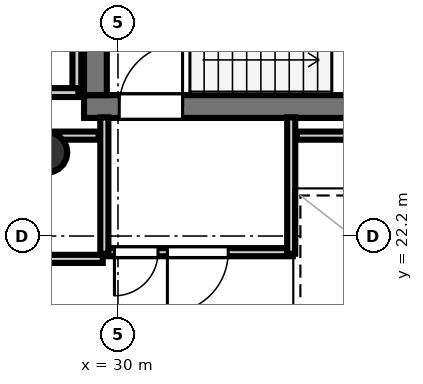
"""IFC4 building model, lengths in metres.
Left out: names, types, materials, properties, quantities, classifications, styles, units other than length and angle.
Written with IfcOpenShell. Run it as: python <this file> out.ifc"""

import sys

from ifc_helpers import new_model, si_unit, direction, frame, frame_2d, origin, origin_2d, place, context, subcontext, project, spatial, rectangle, hollow_circle, extrude, element, fill, save


model = new_model("IFC4")
c1 = context("Model", 3, precision=1e-05, world=origin(), true_north=direction((0.0, 1.0)))
c2 = subcontext(c1, "Body", "Model", "MODEL_VIEW")
j1 = project(units=[si_unit("LENGTHUNIT", "METRE"), si_unit("PLANEANGLEUNIT", "RADIAN")], contexts=[c1])
p1 = place(None, origin())
s1 = spatial("IfcSite", under=j1, at=p1, CompositionType="ELEMENT")
p2 = place(p1, origin())
s2 = spatial("IfcBuilding", under=s1, at=p2, CompositionType="ELEMENT")
p3 = place(p2, frame((0.0, 0.0, 333.3)))
s3 = spatial("IfcBuildingStorey", under=s2, at=p3, CompositionType="ELEMENT", Elevation=333.3)
p4 = place(p3, frame((29.33, 24.755, 0.0), z_axis=(0.0, 0.0, 1.0), x_axis=(1.0, 0.0, 0.0)))
e1 = element("IfcWall", 1, at=p4, inside=s3, PredefinedType="SHEAR", context=c2, shape_type="SweptSolid", body=[
    extrude(rectangle(XDim=10.52, YDim=0.45, at=frame_2d((5.26, 0.0))), origin(), (0.0, 0.0, 1.0), 3.52),
])
p5 = place(p4, frame((0.695, 0.0, 0.0)))
e2 = element("IfcOpeningElement", 2, at=p5, cuts=e1, PredefinedType="OPENING", context=c2, shape_type="SweptSolid", body=[
    extrude(rectangle(XDim=1.25, YDim=2.15, at=frame_2d((0.625, 1.075))), frame((0.0, 0.235, 0.0), z_axis=(0.0, -1.0, 0.0), x_axis=(1.0, 0.0, 0.0)), (0.0, 0.0, 1.0), 0.47),
])
p6 = place(p3, frame((29.555, 24.98, 0.0), z_axis=(0.0, 0.0, 1.0), x_axis=(0.0, 1.0, 0.0)))
e3 = element("IfcWall", 3, at=p6, inside=s3, PredefinedType="SHEAR", context=c2, shape_type="SweptSolid", body=[
    extrude(rectangle(XDim=7.44, YDim=0.45, at=frame_2d((3.72, 0.0))), origin(), (0.0, 0.0, 1.0), 3.52),
])
p7 = place(p3, frame((28.6, 23.85, 0.0), z_axis=(0.0, 0.0, 1.0), x_axis=(1.0, 0.0, 0.0)))
e4 = element("IfcColumn", 4, at=p7, inside=s3, PredefinedType="COLUMN", context=c2, shape_type="SweptSolid", body=[
    extrude(hollow_circle(Radius=0.4, WallThickness=0.022, at=origin_2d()), origin(), (0.0, 0.0, 1.0), 3.7),
])
p8 = place(p3, frame((33.45, 21.881, 0.0), z_axis=(0.0, 0.0, 1.0), x_axis=(-1.0, 0.0, 0.0)))
e5 = element("IfcWall", 5, at=p8, inside=s3, PredefinedType="PARTITIONING", context=c2, shape_type="SweptSolid", body=[
    extrude(rectangle(XDim=3.75, YDim=0.16, at=frame_2d((1.875, 0.0))), origin(), (0.0, 0.0, 1.0), 2.84),
])
p9 = place(p8, frame((1.275, 0.0, 0.0)))
e6 = element("IfcOpeningElement", 6, at=p9, cuts=e5, PredefinedType="OPENING", context=c2, shape_type="SweptSolid", body=[
    extrude(rectangle(XDim=1.2, YDim=2.15, at=frame_2d((0.6, 1.075))), frame((0.0, 0.09, 0.0), z_axis=(0.0, -1.0, 0.0), x_axis=(1.0, 0.0, 0.0)), (0.0, 0.0, 1.0), 0.18),
])
p10 = place(p8, frame((2.66, 0.0, 0.0)))
e7 = element("IfcOpeningElement", 7, at=p10, cuts=e5, PredefinedType="OPENING", context=c2, shape_type="SweptSolid", body=[
    extrude(rectangle(XDim=0.86, YDim=2.05, at=frame_2d((0.43, 1.025))), frame((0.0, 0.09, 0.0), z_axis=(0.0, -1.0, 0.0), x_axis=(1.0, 0.0, 0.0)), (0.0, 0.0, 1.0), 0.18),
])
for number, where, z_axis, x_axis in (
    (8, (29.731, 21.85, 0.0), (0.0, 0.0, 1.0), (0.0, 1.0, 0.0)),
    (9, (33.419, 24.542, 0.0), (0.0, 0.0, 1.0), (0.0, -1.0, 0.0)),
):
    element("IfcWall", number, at=place(p3, frame(where, z_axis=z_axis, x_axis=x_axis)), inside=s3, PredefinedType="PARTITIONING", context=c2, shape_type="SweptSolid", body=[
        extrude(rectangle(XDim=2.692, YDim=0.16, at=frame_2d((1.346, 0.0))), origin(), (0.0, 0.0, 1.0), 2.84),
    ])
p11 = place(p3, frame((29.189, 29.12, 0.0), z_axis=(0.0, 0.0, 1.0), x_axis=(0.0, -1.0, 0.0)))
e10 = element("IfcWall", 10, at=p11, inside=s3, PredefinedType="PLUMBINGWALL", context=c2, shape_type="SweptSolid", body=[
    extrude(rectangle(XDim=4.12, YDim=0.175, at=frame_2d((2.06, 0.0))), origin(), (0.0, 0.0, 1.0), 2.84),
])
p12 = place(p3, frame((29.22, 25.031, 0.0), z_axis=(0.0, 0.0, 1.0), x_axis=(-1.0, 0.0, 0.0)))
e11 = element("IfcWall", 11, at=p12, inside=s3, PredefinedType="PLUMBINGWALL", context=c2, shape_type="SweptSolid", body=[
    extrude(rectangle(XDim=1.5, YDim=0.175, at=frame_2d((0.75, 0.0))), origin(), (0.0, 0.0, 1.0), 2.84),
])
p13 = place(p3, frame((29.62, 24.181, 0.0), z_axis=(0.0, 0.0, 1.0), x_axis=(-1.0, 0.0, 0.0)))
e12 = element("IfcWall", 12, at=p13, inside=s3, PredefinedType="PARTITIONING", context=c2, shape_type="SweptSolid", body=[
    extrude(rectangle(XDim=1.07, YDim=0.16, at=frame_2d((0.535, 0.0))), origin(), (0.0, 0.0, 1.0), 2.84),
])
p14 = place(p3, frame((39.75, 24.181, 0.0), z_axis=(0.0, 0.0, 1.0), x_axis=(-1.0, 0.0, 0.0)))
e13 = element("IfcWall", 13, at=p14, inside=s3, PredefinedType="PARTITIONING", context=c2, shape_type="SweptSolid", body=[
    extrude(rectangle(XDim=6.22, YDim=0.16, at=frame_2d((3.11, 0.0))), origin(), (0.0, 0.0, 1.0), 2.84),
])
p15 = place(p3, frame((27.62, 21.749, 0.0), z_axis=(0.0, 0.0, 1.0), x_axis=(1.0, 0.0, 0.0)))
e14 = element("IfcWall", 14, at=p15, inside=s3, PredefinedType="PARTITIONING", context=c2, shape_type="SweptSolid", body=[
    extrude(rectangle(XDim=2.08, YDim=0.16, at=frame_2d((1.04, 0.0))), origin(), (0.0, 0.0, 1.0), 2.84),
])
p16 = place(p5, origin())
e15 = element("IfcDoor", 15, at=p16, inside=s3, OperationType="SINGLE_SWING_RIGHT", PredefinedType="DOOR", context=c2, shape_type="SweptSolid", body=[
    extrude(rectangle(XDim=1.25, YDim=2.15, at=frame_2d((0.625, 1.075))), frame((0.0, 0.025, 0.0), z_axis=(0.0, -1.0, 0.0), x_axis=(1.0, 0.0, 0.0)), (0.0, 0.0, 1.0), 0.05),
])
fill(e2, e15)
p17 = place(p9, origin())
e16 = element("IfcDoor", 16, at=p17, inside=s3, OperationType="SINGLE_SWING_RIGHT", PredefinedType="DOOR", context=c2, shape_type="SweptSolid", body=[
    extrude(rectangle(XDim=1.2, YDim=2.15, at=frame_2d((0.6, 1.075))), frame((0.0, 0.025, 0.0), z_axis=(0.0, -1.0, 0.0), x_axis=(1.0, 0.0, 0.0)), (0.0, 0.0, 1.0), 0.05),
])
fill(e6, e16)
p18 = place(p10, origin())
e17 = element("IfcDoor", 17, at=p18, inside=s3, OperationType="SINGLE_SWING_RIGHT", PredefinedType="DOOR", context=c2, shape_type="SweptSolid", body=[
    extrude(rectangle(XDim=0.86, YDim=2.05, at=frame_2d((0.43, 1.025))), frame((0.0, 0.025, 0.0), z_axis=(0.0, -1.0, 0.0), x_axis=(1.0, 0.0, 0.0)), (0.0, 0.0, 1.0), 0.05),
])
fill(e7, e17)
save(model, sys.argv[1])
